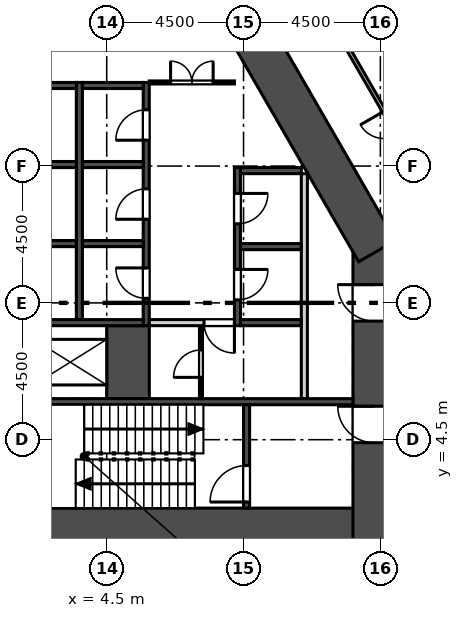
"""IFC4 building model, lengths in metres.
Left out: names, types, materials, properties, quantities, classifications, styles, units other than length and angle.
Written with IfcOpenShell. Run it as: python <this file> out.ifc"""

import sys

from ifc_helpers import new_model, si_unit, direction, frame, frame_2d, origin, place, context, subcontext, project, spatial, rectangle, extrude, element, fill, save


model = new_model("IFC4")
c1 = context("Model", 3, precision=1e-05, world=origin(), true_north=direction((0.0, 1.0)))
c2 = subcontext(c1, "Body", "Model", "MODEL_VIEW")
j1 = project(units=[si_unit("LENGTHUNIT", "METRE"), si_unit("PLANEANGLEUNIT", "RADIAN")], contexts=[c1])
p1 = place(None, origin())
s1 = spatial("IfcSite", under=j1, at=p1, CompositionType="ELEMENT")
p2 = place(p1, origin())
s2 = spatial("IfcBuilding", under=s1, at=p2, CompositionType="ELEMENT")
p3 = place(p2, frame((0.0, 0.0, 25.0)))
s3 = spatial("IfcBuildingStorey", under=s2, at=p3, CompositionType="ELEMENT", Elevation=25.0)
p4 = place(p3, frame((-14.0, 1.55, 0.0), z_axis=(0.0, 0.0, 1.0), x_axis=(1.0, 0.0, 0.0)))
e1 = element("IfcWall", 1, at=p4, inside=s3, PredefinedType="SHEAR", context=c2, shape_type="SweptSolid", body=[
    extrude(rectangle(XDim=28.0, YDim=1.4, at=frame_2d((14.0, 0.0))), origin(), (0.0, 0.0, 1.0), 4.5),
])
p5 = place(p3, frame((13.3, 0.85, 0.0), z_axis=(0.0, 0.0, 1.0), x_axis=(0.0, 1.0, 0.0)))
e2 = element("IfcWall", 2, at=p5, inside=s3, PredefinedType="SHEAR", context=c2, shape_type="SweptSolid", body=[
    extrude(rectangle(XDim=10.202, YDim=1.4, at=frame_2d((5.101, 0.0))), origin(), (0.0, 0.0, 1.0), 4.5),
])
p6 = place(p5, frame((3.55, 0.0, 0.0)))
e3 = element("IfcOpeningElement", 3, at=p6, cuts=e2, PredefinedType="OPENING", context=c2, shape_type="SweptSolid", body=[
    extrude(rectangle(XDim=1.2, YDim=2.1, at=frame_2d((0.6, 1.05))), frame((0.0, 0.71, 0.0), z_axis=(0.0, -1.0, 0.0), x_axis=(1.0, 0.0, 0.0)), (0.0, 0.0, 1.0), 1.42),
])
p7 = place(p5, frame((7.55, 0.0, 0.0)))
e4 = element("IfcOpeningElement", 4, at=p7, cuts=e2, PredefinedType="OPENING", context=c2, shape_type="SweptSolid", body=[
    extrude(rectangle(XDim=1.2, YDim=2.1, at=frame_2d((0.6, 1.05))), frame((0.0, 0.71, 0.0), z_axis=(0.0, -1.0, 0.0), x_axis=(1.0, 0.0, 0.0)), (0.0, 0.0, 1.0), 1.42),
])
p8 = place(p3, frame((13.394, 10.703, 0.0), z_axis=(0.0, 0.0, 1.0), x_axis=(-0.50000187635, 0.866024320471, 0.0)))
e5 = element("IfcWall", 5, at=p8, inside=s3, PredefinedType="SHEAR", context=c2, shape_type="SweptSolid", body=[
    extrude(rectangle(XDim=9.177, YDim=1.4, at=frame_2d((4.588, 0.0))), origin(), (0.0, 0.0, 1.0), 4.5),
])
p9 = place(p3, frame((32.353, 7.709, 0.0), z_axis=(0.0, 0.0, 1.0), x_axis=(-0.500000836325, 0.866024920931, 0.0)))
e6 = element("IfcWall", 6, at=p9, inside=s3, PredefinedType="SOLIDWALL", context=c2, shape_type="SweptSolid", body=[
    extrude(rectangle(XDim=56.0, YDim=0.34, at=frame_2d((28.0, 0.0))), origin(), (0.0, 0.0, 1.0), 4.2),
])
p10 = place(p9, frame((1.5, 0.0, 0.9)))
e7 = element("IfcOpeningElement", 7, at=p10, cuts=e6, PredefinedType="OPENING", context=c2, shape_type="SweptSolid", body=[
    extrude(rectangle(XDim=1.885, YDim=3.0, at=frame_2d((0.942, 1.5))), frame((0.0, 0.18, 0.0), z_axis=(0.0, -1.0, 0.0), x_axis=(1.0, 0.0, 0.0)), (0.0, 0.0, 1.0), 0.36),
])
p11 = place(p9, frame((4.5, 0.0, 0.9)))
e8 = element("IfcOpeningElement", 8, at=p11, cuts=e6, PredefinedType="OPENING", context=c2, shape_type="SweptSolid", body=[
    extrude(rectangle(XDim=1.885, YDim=3.0, at=frame_2d((0.942, 1.5))), frame((0.0, 0.18, 0.0), z_axis=(0.0, -1.0, 0.0), x_axis=(1.0, 0.0, 0.0)), (0.0, 0.0, 1.0), 0.36),
])
p12 = place(p9, frame((7.5, 0.0, 0.9)))
e9 = element("IfcOpeningElement", 9, at=p12, cuts=e6, PredefinedType="OPENING", context=c2, shape_type="SweptSolid", body=[
    extrude(rectangle(XDim=1.885, YDim=3.0, at=frame_2d((0.942, 1.5))), frame((0.0, 0.18, 0.0), z_axis=(0.0, -1.0, 0.0), x_axis=(1.0, 0.0, 0.0)), (0.0, 0.0, 1.0), 0.36),
])
p13 = place(p9, frame((10.5, 0.0, 0.9)))
e10 = element("IfcOpeningElement", 10, at=p13, cuts=e6, PredefinedType="OPENING", context=c2, shape_type="SweptSolid", body=[
    extrude(rectangle(XDim=1.885, YDim=3.0, at=frame_2d((0.942, 1.5))), frame((0.0, 0.18, 0.0), z_axis=(0.0, -1.0, 0.0), x_axis=(1.0, 0.0, 0.0)), (0.0, 0.0, 1.0), 0.36),
])
p14 = place(p9, frame((13.5, 0.0, 0.9)))
e11 = element("IfcOpeningElement", 11, at=p14, cuts=e6, PredefinedType="OPENING", context=c2, shape_type="SweptSolid", body=[
    extrude(rectangle(XDim=1.885, YDim=3.0, at=frame_2d((0.942, 1.5))), frame((0.0, 0.18, 0.0), z_axis=(0.0, -1.0, 0.0), x_axis=(1.0, 0.0, 0.0)), (0.0, 0.0, 1.0), 0.36),
])
p15 = place(p9, frame((16.5, 0.0, 0.9)))
e12 = element("IfcOpeningElement", 12, at=p15, cuts=e6, PredefinedType="OPENING", context=c2, shape_type="SweptSolid", body=[
    extrude(rectangle(XDim=1.885, YDim=3.0, at=frame_2d((0.942, 1.5))), frame((0.0, 0.18, 0.0), z_axis=(0.0, -1.0, 0.0), x_axis=(1.0, 0.0, 0.0)), (0.0, 0.0, 1.0), 0.36),
])
p16 = place(p9, frame((19.5, 0.0, 0.9)))
e13 = element("IfcOpeningElement", 13, at=p16, cuts=e6, PredefinedType="OPENING", context=c2, shape_type="SweptSolid", body=[
    extrude(rectangle(XDim=1.885, YDim=3.0, at=frame_2d((0.942, 1.5))), frame((0.0, 0.18, 0.0), z_axis=(0.0, -1.0, 0.0), x_axis=(1.0, 0.0, 0.0)), (0.0, 0.0, 1.0), 0.36),
])
p17 = place(p9, frame((22.5, 0.0, 0.9)))
e14 = element("IfcOpeningElement", 14, at=p17, cuts=e6, PredefinedType="OPENING", context=c2, shape_type="SweptSolid", body=[
    extrude(rectangle(XDim=1.885, YDim=3.0, at=frame_2d((0.942, 1.5))), frame((0.0, 0.18, 0.0), z_axis=(0.0, -1.0, 0.0), x_axis=(1.0, 0.0, 0.0)), (0.0, 0.0, 1.0), 0.36),
])
p18 = place(p9, frame((25.5, 0.0, 0.9)))
e15 = element("IfcOpeningElement", 15, at=p18, cuts=e6, PredefinedType="OPENING", context=c2, shape_type="SweptSolid", body=[
    extrude(rectangle(XDim=1.885, YDim=3.0, at=frame_2d((0.942, 1.5))), frame((0.0, 0.18, 0.0), z_axis=(0.0, -1.0, 0.0), x_axis=(1.0, 0.0, 0.0)), (0.0, 0.0, 1.0), 0.36),
])
p19 = place(p9, frame((28.5, 0.0, 0.9)))
e16 = element("IfcOpeningElement", 16, at=p19, cuts=e6, PredefinedType="OPENING", context=c2, shape_type="SweptSolid", body=[
    extrude(rectangle(XDim=1.885, YDim=3.0, at=frame_2d((0.942, 1.5))), frame((0.0, 0.18, 0.0), z_axis=(0.0, -1.0, 0.0), x_axis=(1.0, 0.0, 0.0)), (0.0, 0.0, 1.0), 0.36),
])
p20 = place(p9, frame((31.5, 0.0, 0.0)))
e17 = element("IfcOpeningElement", 17, at=p20, cuts=e6, PredefinedType="OPENING", context=c2, shape_type="SweptSolid", body=[
    extrude(rectangle(XDim=1.885, YDim=2.6, at=frame_2d((0.942, 1.3))), frame((0.0, 0.18, 0.0), z_axis=(0.0, -1.0, 0.0), x_axis=(1.0, 0.0, 0.0)), (0.0, 0.0, 1.0), 0.36),
])
p21 = place(p9, frame((34.5, 0.0, 0.9)))
e18 = element("IfcOpeningElement", 18, at=p21, cuts=e6, PredefinedType="OPENING", context=c2, shape_type="SweptSolid", body=[
    extrude(rectangle(XDim=1.885, YDim=3.0, at=frame_2d((0.942, 1.5))), frame((0.0, 0.18, 0.0), z_axis=(0.0, -1.0, 0.0), x_axis=(1.0, 0.0, 0.0)), (0.0, 0.0, 1.0), 0.36),
])
p22 = place(p9, frame((37.5, 0.0, 0.9)))
e19 = element("IfcOpeningElement", 19, at=p22, cuts=e6, PredefinedType="OPENING", context=c2, shape_type="SweptSolid", body=[
    extrude(rectangle(XDim=1.885, YDim=3.0, at=frame_2d((0.942, 1.5))), frame((0.0, 0.18, 0.0), z_axis=(0.0, -1.0, 0.0), x_axis=(1.0, 0.0, 0.0)), (0.0, 0.0, 1.0), 0.36),
])
p23 = place(p9, frame((40.5, 0.0, 0.9)))
e20 = element("IfcOpeningElement", 20, at=p23, cuts=e6, PredefinedType="OPENING", context=c2, shape_type="SweptSolid", body=[
    extrude(rectangle(XDim=1.885, YDim=3.0, at=frame_2d((0.942, 1.5))), frame((0.0, 0.18, 0.0), z_axis=(0.0, -1.0, 0.0), x_axis=(1.0, 0.0, 0.0)), (0.0, 0.0, 1.0), 0.36),
])
p24 = place(p9, frame((43.5, 0.0, 0.9)))
e21 = element("IfcOpeningElement", 21, at=p24, cuts=e6, PredefinedType="OPENING", context=c2, shape_type="SweptSolid", body=[
    extrude(rectangle(XDim=1.885, YDim=3.0, at=frame_2d((0.942, 1.5))), frame((0.0, 0.18, 0.0), z_axis=(0.0, -1.0, 0.0), x_axis=(1.0, 0.0, 0.0)), (0.0, 0.0, 1.0), 0.36),
])
p25 = place(p9, frame((46.5, 0.0, 0.9)))
e22 = element("IfcOpeningElement", 22, at=p25, cuts=e6, PredefinedType="OPENING", context=c2, shape_type="SweptSolid", body=[
    extrude(rectangle(XDim=1.885, YDim=3.0, at=frame_2d((0.942, 1.5))), frame((0.0, 0.18, 0.0), z_axis=(0.0, -1.0, 0.0), x_axis=(1.0, 0.0, 0.0)), (0.0, 0.0, 1.0), 0.36),
])
p26 = place(p9, frame((49.5, 0.0, 0.9)))
e23 = element("IfcOpeningElement", 23, at=p26, cuts=e6, PredefinedType="OPENING", context=c2, shape_type="SweptSolid", body=[
    extrude(rectangle(XDim=1.885, YDim=3.0, at=frame_2d((0.942, 1.5))), frame((0.0, 0.18, 0.0), z_axis=(0.0, -1.0, 0.0), x_axis=(1.0, 0.0, 0.0)), (0.0, 0.0, 1.0), 0.36),
])
p27 = place(p9, frame((52.5, 0.0, 0.9)))
e24 = element("IfcOpeningElement", 24, at=p27, cuts=e6, PredefinedType="OPENING", context=c2, shape_type="SweptSolid", body=[
    extrude(rectangle(XDim=1.885, YDim=3.0, at=frame_2d((0.942, 1.5))), frame((0.0, 0.18, 0.0), z_axis=(0.0, -1.0, 0.0), x_axis=(1.0, 0.0, 0.0)), (0.0, 0.0, 1.0), 0.36),
])
p28 = place(p3, frame((11.0, 5.85, 0.0), z_axis=(0.0, 0.0, 1.0), x_axis=(0.0, 1.0, 0.0)))
e25 = element("IfcWall", 25, at=p28, inside=s3, PredefinedType="SOLIDWALL", context=c2, shape_type="SweptSolid", body=[
    extrude(rectangle(XDim=7.4, YDim=0.2, at=frame_2d((3.7, 0.0))), origin(), (0.0, 0.0, 1.0), 4.2),
])
p29 = place(p3, frame((8.8, 8.25, -2.0), z_axis=(0.0, 0.0, 1.0), x_axis=(0.0, 1.0, 0.0)))
e26 = element("IfcWall", 26, at=p29, inside=s3, PredefinedType="SOLIDWALL", context=c2, shape_type="SweptSolid", body=[
    extrude(rectangle(XDim=5.2, YDim=0.2, at=frame_2d((2.6, 0.0))), origin(), (0.0, 0.0, 1.0), 6.2),
])
p30 = place(p29, frame((0.85, 0.0, 2.0)))
e27 = element("IfcOpeningElement", 27, at=p30, cuts=e26, PredefinedType="OPENING", context=c2, shape_type="SweptSolid", body=[
    extrude(rectangle(XDim=1.0, YDim=2.1, at=frame_2d((0.5, 1.05))), frame((0.0, 0.11, 0.0), z_axis=(0.0, -1.0, 0.0), x_axis=(1.0, 0.0, 0.0)), (0.0, 0.0, 1.0), 0.22),
])
p31 = place(p29, frame((3.35, 0.0, 2.0)))
e28 = element("IfcOpeningElement", 28, at=p31, cuts=e26, PredefinedType="OPENING", context=c2, shape_type="SweptSolid", body=[
    extrude(rectangle(XDim=1.0, YDim=2.1, at=frame_2d((0.5, 1.05))), frame((0.0, 0.11, 0.0), z_axis=(0.0, -1.0, 0.0), x_axis=(1.0, 0.0, 0.0)), (0.0, 0.0, 1.0), 0.22),
])
p32 = place(p3, frame((5.8, 8.25, -2.0), z_axis=(0.0, 0.0, 1.0), x_axis=(0.0, 1.0, 0.0)))
e29 = element("IfcWall", 29, at=p32, inside=s3, PredefinedType="SOLIDWALL", context=c2, shape_type="SweptSolid", body=[
    extrude(rectangle(XDim=8.0, YDim=0.2, at=frame_2d((4.0, 0.0))), origin(), (0.0, 0.0, 1.0), 6.2),
])
p33 = place(p32, frame((0.9, 0.0, 2.0)))
e30 = element("IfcOpeningElement", 30, at=p33, cuts=e29, PredefinedType="OPENING", context=c2, shape_type="SweptSolid", body=[
    extrude(rectangle(XDim=1.0, YDim=2.1, at=frame_2d((0.5, 1.05))), frame((0.0, 0.11, 0.0), z_axis=(0.0, -1.0, 0.0), x_axis=(1.0, 0.0, 0.0)), (0.0, 0.0, 1.0), 0.22),
])
p34 = place(p32, frame((3.5, 0.0, 2.0)))
e31 = element("IfcOpeningElement", 31, at=p34, cuts=e29, PredefinedType="OPENING", context=c2, shape_type="SweptSolid", body=[
    extrude(rectangle(XDim=1.0, YDim=2.1, at=frame_2d((0.5, 1.05))), frame((0.0, 0.11, 0.0), z_axis=(0.0, -1.0, 0.0), x_axis=(1.0, 0.0, 0.0)), (0.0, 0.0, 1.0), 0.22),
])
p35 = place(p32, frame((6.1, 0.0, 2.0)))
e32 = element("IfcOpeningElement", 32, at=p35, cuts=e29, PredefinedType="OPENING", context=c2, shape_type="SweptSolid", body=[
    extrude(rectangle(XDim=1.0, YDim=2.1, at=frame_2d((0.5, 1.05))), frame((0.0, 0.11, 0.0), z_axis=(0.0, -1.0, 0.0), x_axis=(1.0, 0.0, 0.0)), (0.0, 0.0, 1.0), 0.22),
])
p36 = place(p3, frame((3.6, 8.45, -2.0), z_axis=(0.0, 0.0, 1.0), x_axis=(0.0, 1.0, 0.0)))
e33 = element("IfcWall", 33, at=p36, inside=s3, PredefinedType="SOLIDWALL", context=c2, shape_type="SweptSolid", body=[
    extrude(rectangle(XDim=7.8, YDim=0.2, at=frame_2d((3.9, 0.0))), origin(), (0.0, 0.0, 1.0), 6.2),
])
p37 = place(p3, frame((5.2, 5.85, -2.0), z_axis=(0.0, 0.0, 1.0), x_axis=(0.0, 1.0, 0.0)))
e34 = element("IfcWall", 34, at=p37, inside=s3, PredefinedType="SOLIDWALL", context=c2, shape_type="SweptSolid", body=[
    extrude(rectangle(XDim=2.4, YDim=1.4, at=frame_2d((1.2, 0.0))), origin(), (0.0, 0.0, 1.0), 6.2),
])
p38 = place(p3, frame((8.9, 8.35, -2.0), z_axis=(0.0, 0.0, 1.0), x_axis=(1.0, 0.0, 0.0)))
e35 = element("IfcWall", 35, at=p38, inside=s3, PredefinedType="SOLIDWALL", context=c2, shape_type="SweptSolid", body=[
    extrude(rectangle(XDim=2.0, YDim=0.2, at=frame_2d((1.0, 0.0))), origin(), (0.0, 0.0, 1.0), 6.2),
])
p39 = place(p3, frame((1.5, 8.35, -2.0), z_axis=(0.0, 0.0, 1.0), x_axis=(1.0, 0.0, 0.0)))
e36 = element("IfcWall", 36, at=p39, inside=s3, PredefinedType="SOLIDWALL", context=c2, shape_type="SweptSolid", body=[
    extrude(rectangle(XDim=4.2, YDim=0.2, at=frame_2d((2.1, 0.0))), origin(), (0.0, 0.0, 1.0), 6.2),
])
p40 = place(p3, frame((1.2, 5.75, -2.0), z_axis=(0.0, 0.0, 1.0), x_axis=(1.0, 0.0, 0.0)))
e37 = element("IfcWall", 37, at=p40, inside=s3, PredefinedType="SOLIDWALL", context=c2, shape_type="SweptSolid", body=[
    extrude(rectangle(XDim=11.4, YDim=0.2, at=frame_2d((5.7, 0.0))), origin(), (0.0, 0.0, 1.0), 6.2),
])
p41 = place(p3, frame((9.1, 2.25, -2.0), z_axis=(0.0, 0.0, 1.0), x_axis=(0.0, 1.0, 0.0)))
e38 = element("IfcWall", 38, at=p41, inside=s3, PredefinedType="SOLIDWALL", context=c2, shape_type="SweptSolid", body=[
    extrude(rectangle(XDim=3.4, YDim=0.2, at=frame_2d((1.7, 0.0))), origin(), (0.0, 0.0, 1.0), 6.2),
])
p42 = place(p41, frame((0.2, 0.0, 2.0)))
e39 = element("IfcOpeningElement", 39, at=p42, cuts=e38, PredefinedType="OPENING", context=c2, shape_type="SweptSolid", body=[
    extrude(rectangle(XDim=1.2, YDim=2.1, at=frame_2d((0.6, 1.05))), frame((0.0, 0.11, 0.0), z_axis=(0.0, -1.0, 0.0), x_axis=(1.0, 0.0, 0.0)), (0.0, 0.0, 1.0), 0.22),
])
for number, where, z_axis, x_axis in (
    (40, (8.9, 10.85, -2.0), (0.0, 0.0, 1.0), (1.0, 0.0, 0.0)),
    (41, (8.9, 13.35, -2.0), (0.0, 0.0, 1.0), (1.0, 0.0, 0.0)),
    (42, (3.7, 10.95, -2.0), (0.0, 0.0, 1.0), (1.0, 0.0, 0.0)),
    (43, (3.7, 13.55, -2.0), (0.0, 0.0, 1.0), (1.0, 0.0, 0.0)),
    (44, (3.7, 16.15, -2.0), (0.0, 0.0, 1.0), (1.0, 0.0, 0.0)),
    (45, (1.5, 10.95, -2.0), (0.0, 0.0, 1.0), (1.0, 0.0, 0.0)),
    (46, (1.5, 13.55, -2.0), (0.0, 0.0, 1.0), (1.0, 0.0, 0.0)),
    (47, (1.5, 16.15, -2.0), (0.0, 0.0, 1.0), (1.0, 0.0, 0.0)),
):
    element("IfcWall", number, at=place(p3, frame(where, z_axis=z_axis, x_axis=x_axis)), inside=s3, PredefinedType="SOLIDWALL", context=c2, shape_type="SweptSolid", body=[
        extrude(rectangle(XDim=2.0, YDim=0.2, at=frame_2d((1.0, 0.0))), origin(), (0.0, 0.0, 1.0), 6.2),
    ])
p43 = place(p3, frame((5.9, 16.25, 0.0), z_axis=(0.0, 0.0, 1.0), x_axis=(1.0, 0.0, 0.0)))
e48 = element("IfcWall", 48, at=p43, inside=s3, PredefinedType="PARTITIONING", context=c2, shape_type="SweptSolid", body=[
    extrude(rectangle(XDim=2.8, YDim=0.1, at=frame_2d((1.4, 0.0))), origin(), (0.0, 0.0, 1.0), 4.2),
])
p44 = place(p43, frame((0.7, 0.0, 0.0)))
e49 = element("IfcOpeningElement", 49, at=p44, cuts=e48, PredefinedType="OPENING", context=c2, shape_type="SweptSolid", body=[
    extrude(rectangle(XDim=1.4, YDim=2.1, at=frame_2d((0.7, 1.05))), frame((0.0, 0.06, 0.0), z_axis=(0.0, -1.0, 0.0), x_axis=(1.0, 0.0, 0.0)), (0.0, 0.0, 1.0), 0.12),
])
p45 = place(p3, frame((7.6, 5.85, 0.0), z_axis=(0.0, 0.0, 1.0), x_axis=(0.0, 1.0, 0.0)))
e50 = element("IfcWall", 50, at=p45, inside=s3, PredefinedType="PARTITIONING", context=c2, shape_type="SweptSolid", body=[
    extrude(rectangle(XDim=2.4, YDim=0.1, at=frame_2d((1.2, 0.0))), origin(), (0.0, 0.0, 1.0), 4.2),
])
p46 = place(p45, frame((0.7, 0.0, 0.0)))
e51 = element("IfcOpeningElement", 51, at=p46, cuts=e50, PredefinedType="OPENING", context=c2, shape_type="SweptSolid", body=[
    extrude(rectangle(XDim=0.9, YDim=2.1, at=frame_2d((0.45, 1.05))), frame((0.0, 0.06, 0.0), z_axis=(0.0, -1.0, 0.0), x_axis=(1.0, 0.0, 0.0)), (0.0, 0.0, 1.0), 0.12),
])
p47 = place(p3, frame((5.9, 8.35, 0.0), z_axis=(0.0, 0.0, 1.0), x_axis=(1.0, 0.0, 0.0)))
e52 = element("IfcWall", 52, at=p47, inside=s3, PredefinedType="SOLIDWALL", context=c2, shape_type="SweptSolid", body=[
    extrude(rectangle(XDim=2.8, YDim=0.2, at=frame_2d((1.4, 0.0))), origin(), (0.0, 0.0, 1.0), 4.2),
])
p48 = place(p47, frame((1.8, 0.0, 0.0)))
e53 = element("IfcOpeningElement", 53, at=p48, cuts=e52, PredefinedType="OPENING", context=c2, shape_type="SweptSolid", body=[
    extrude(rectangle(XDim=1.0, YDim=2.1, at=frame_2d((0.5, 1.05))), frame((0.0, 0.11, 0.0), z_axis=(0.0, -1.0, 0.0), x_axis=(1.0, 0.0, 0.0)), (0.0, 0.0, 1.0), 0.22),
])
p49 = place(p3, frame((11.062, 19.74, 0.0), z_axis=(0.0, 0.0, 1.0), x_axis=(0.499995462694, -0.866028023383, 0.0)))
e54 = element("IfcWall", 54, at=p49, inside=s3, PredefinedType="PARTITIONING", context=c2, shape_type="SweptSolid", body=[
    extrude(rectangle(XDim=9.444, YDim=0.125, at=frame_2d((4.722, 0.0))), origin(), (0.0, 0.0, 1.0), 4.2),
])
p50 = place(p49, frame((5.121, 0.0, 0.0)))
e55 = element("IfcOpeningElement", 55, at=p50, cuts=e54, PredefinedType="OPENING", context=c2, shape_type="SweptSolid", body=[
    extrude(rectangle(XDim=1.8, YDim=2.1, at=frame_2d((0.9, 1.05))), frame((0.0, 0.073, 0.0), z_axis=(0.0, -1.0, 0.0), x_axis=(1.0, 0.0, 0.0)), (0.0, 0.0, 1.0), 0.145),
])
p51 = place(p3, frame((13.045, 21.812, 0.0), z_axis=(0.0, 0.0, 1.0), x_axis=(0.499994727438, -0.866028447878, 0.0)))
e56 = element("IfcWall", 56, at=p51, inside=s3, PredefinedType="PARTITIONING", context=c2, shape_type="SweptSolid", body=[
    extrude(rectangle(XDim=11.85, YDim=0.15, at=frame_2d((5.925, 0.0))), origin(), (0.0, 0.0, 1.0), 4.2),
])
p52 = place(p51, frame((5.425, 0.0, 0.0)))
e57 = element("IfcOpeningElement", 57, at=p52, cuts=e56, PredefinedType="OPENING", context=c2, shape_type="SweptSolid", body=[
    extrude(rectangle(XDim=1.0, YDim=2.1, at=frame_2d((0.5, 1.05))), frame((0.0, 0.085, 0.0), z_axis=(0.0, -1.0, 0.0), x_axis=(1.0, 0.0, 0.0)), (0.0, 0.0, 1.0), 0.17),
])
p53 = place(p30, frame((1.0, 0.0, 0.0), z_axis=(0.0, 0.0, 1.0), x_axis=(-1.0, 0.0, 0.0)))
e58 = element("IfcDoor", 58, at=p53, inside=s3, OperationType="SINGLE_SWING_LEFT", PredefinedType="DOOR", context=c2, shape_type="SweptSolid", body=[
    extrude(rectangle(XDim=1.0, YDim=2.1, at=frame_2d((0.5, 1.05))), frame((0.0, 0.025, 0.0), z_axis=(0.0, -1.0, 0.0), x_axis=(1.0, 0.0, 0.0)), (0.0, 0.0, 1.0), 0.05),
])
fill(e27, e58)
p54 = place(p31, frame((1.0, 0.0, 0.0), z_axis=(0.0, 0.0, 1.0), x_axis=(-1.0, 0.0, 0.0)))
e59 = element("IfcDoor", 59, at=p54, inside=s3, OperationType="SINGLE_SWING_LEFT", PredefinedType="DOOR", context=c2, shape_type="SweptSolid", body=[
    extrude(rectangle(XDim=1.0, YDim=2.1, at=frame_2d((0.5, 1.05))), frame((0.0, 0.025, 0.0), z_axis=(0.0, -1.0, 0.0), x_axis=(1.0, 0.0, 0.0)), (0.0, 0.0, 1.0), 0.05),
])
fill(e28, e59)
p55 = place(p33, origin())
e60 = element("IfcDoor", 60, at=p55, inside=s3, OperationType="SINGLE_SWING_RIGHT", PredefinedType="DOOR", context=c2, shape_type="SweptSolid", body=[
    extrude(rectangle(XDim=1.0, YDim=2.1, at=frame_2d((0.5, 1.05))), frame((0.0, 0.025, 0.0), z_axis=(0.0, -1.0, 0.0), x_axis=(1.0, 0.0, 0.0)), (0.0, 0.0, 1.0), 0.05),
])
fill(e30, e60)
p56 = place(p34, origin())
e61 = element("IfcDoor", 61, at=p56, inside=s3, OperationType="SINGLE_SWING_LEFT", PredefinedType="DOOR", context=c2, shape_type="SweptSolid", body=[
    extrude(rectangle(XDim=1.0, YDim=2.1, at=frame_2d((0.5, 1.05))), frame((0.0, 0.025, 0.0), z_axis=(0.0, -1.0, 0.0), x_axis=(1.0, 0.0, 0.0)), (0.0, 0.0, 1.0), 0.05),
])
fill(e31, e61)
p57 = place(p35, origin())
e62 = element("IfcDoor", 62, at=p57, inside=s3, OperationType="SINGLE_SWING_LEFT", PredefinedType="DOOR", context=c2, shape_type="SweptSolid", body=[
    extrude(rectangle(XDim=1.0, YDim=2.1, at=frame_2d((0.5, 1.05))), frame((0.0, 0.025, 0.0), z_axis=(0.0, -1.0, 0.0), x_axis=(1.0, 0.0, 0.0)), (0.0, 0.0, 1.0), 0.05),
])
fill(e32, e62)
p58 = place(p44, origin())
e63 = element("IfcDoor", 63, at=p58, inside=s3, OperationType="DOUBLE_DOOR_SINGLE_SWING", PredefinedType="DOOR", context=c2, shape_type="SweptSolid", body=[
    extrude(rectangle(XDim=1.4, YDim=2.1, at=frame_2d((0.7, 1.05))), frame((0.0, 0.025, 0.0), z_axis=(0.0, -1.0, 0.0), x_axis=(1.0, 0.0, 0.0)), (0.0, 0.0, 1.0), 0.05),
])
fill(e49, e63)
p59 = place(p48, frame((1.0, 0.0, 0.0), z_axis=(0.0, 0.0, 1.0), x_axis=(-1.0, 0.0, 0.0)))
e64 = element("IfcDoor", 64, at=p59, inside=s3, OperationType="SINGLE_SWING_LEFT", PredefinedType="DOOR", context=c2, shape_type="SweptSolid", body=[
    extrude(rectangle(XDim=1.0, YDim=2.1, at=frame_2d((0.5, 1.05))), frame((0.0, 0.025, 0.0), z_axis=(0.0, -1.0, 0.0), x_axis=(1.0, 0.0, 0.0)), (0.0, 0.0, 1.0), 0.05),
])
fill(e53, e64)
p60 = place(p46, origin())
e65 = element("IfcDoor", 65, at=p60, inside=s3, OperationType="SINGLE_SWING_LEFT", PredefinedType="DOOR", context=c2, shape_type="SweptSolid", body=[
    extrude(rectangle(XDim=0.9, YDim=2.1, at=frame_2d((0.45, 1.05))), frame((0.0, 0.025, 0.0), z_axis=(0.0, -1.0, 0.0), x_axis=(1.0, 0.0, 0.0)), (0.0, 0.0, 1.0), 0.05),
])
fill(e51, e65)
p61 = place(p6, origin())
e66 = element("IfcDoor", 66, at=p61, inside=s3, OperationType="SINGLE_SWING_RIGHT", PredefinedType="DOOR", context=c2, shape_type="SweptSolid", body=[
    extrude(rectangle(XDim=1.2, YDim=2.1, at=frame_2d((0.6, 1.05))), frame((0.0, 0.025, 0.0), z_axis=(0.0, -1.0, 0.0), x_axis=(1.0, 0.0, 0.0)), (0.0, 0.0, 1.0), 0.05),
])
fill(e3, e66)
p62 = place(p42, origin())
e67 = element("IfcDoor", 67, at=p62, inside=s3, OperationType="SINGLE_SWING_LEFT", PredefinedType="DOOR", context=c2, shape_type="SweptSolid", body=[
    extrude(rectangle(XDim=1.2, YDim=2.1, at=frame_2d((0.6, 1.05))), frame((0.0, 0.025, 0.0), z_axis=(0.0, -1.0, 0.0), x_axis=(1.0, 0.0, 0.0)), (0.0, 0.0, 1.0), 0.05),
])
fill(e39, e67)
p63 = place(p7, origin())
e68 = element("IfcDoor", 68, at=p63, inside=s3, OperationType="SINGLE_SWING_RIGHT", PredefinedType="DOOR", context=c2, shape_type="SweptSolid", body=[
    extrude(rectangle(XDim=1.2, YDim=2.1, at=frame_2d((0.6, 1.05))), frame((0.0, 0.025, 0.0), z_axis=(0.0, -1.0, 0.0), x_axis=(1.0, 0.0, 0.0)), (0.0, 0.0, 1.0), 0.05),
])
fill(e4, e68)
save(model, sys.argv[1])
